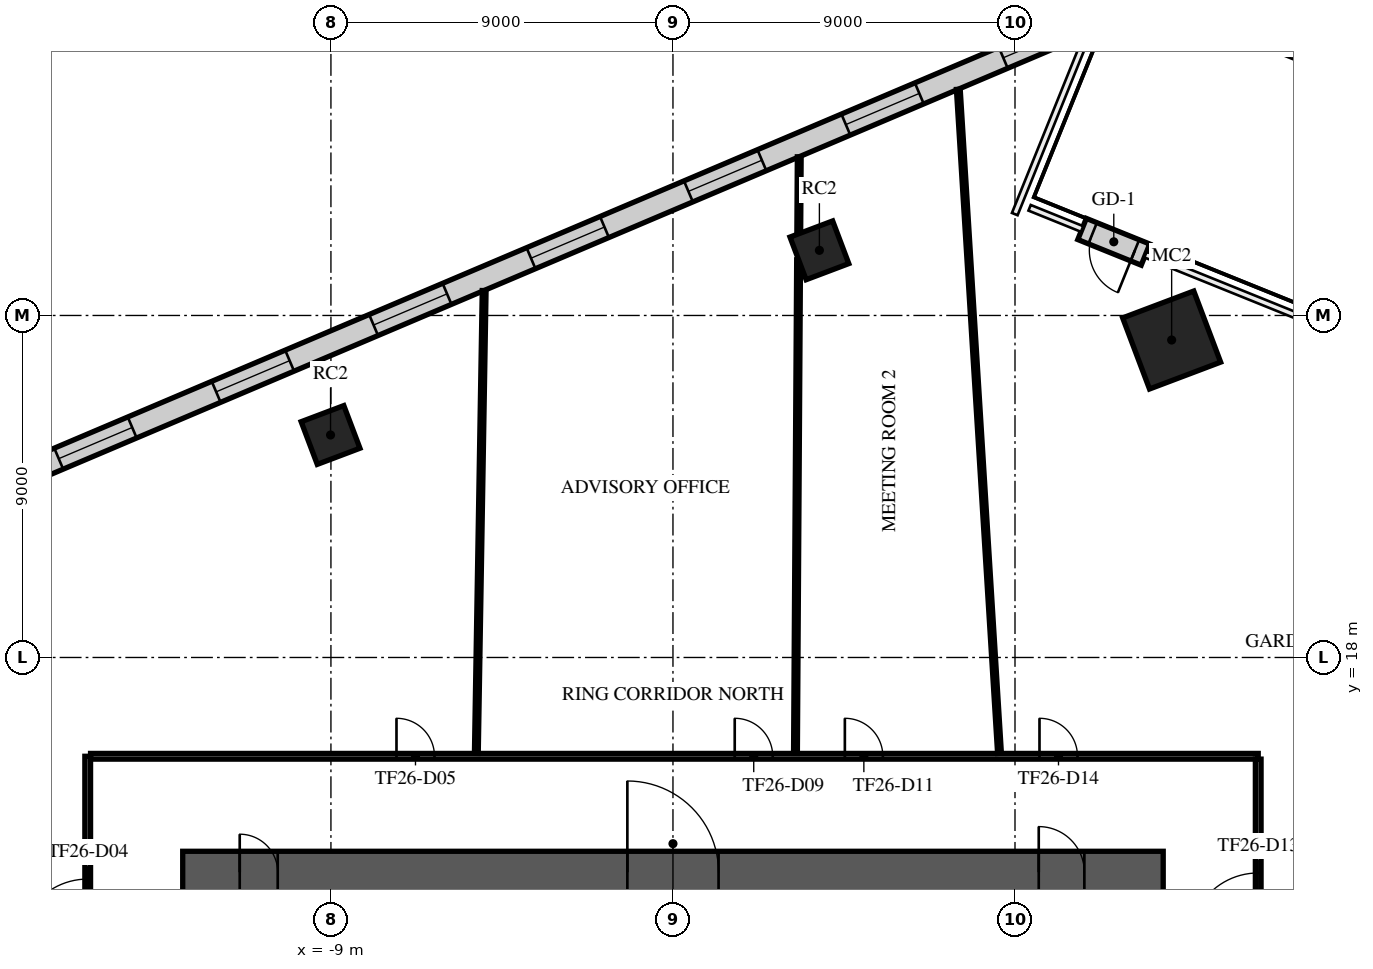
"""IFC4 building model, lengths in metres.
Left out: names, types, materials, properties, quantities, classifications, styles, units other than length and angle.
Written with IfcOpenShell. Run it as: python <this file> out.ifc"""

import sys

from ifc_helpers import new_model, si_unit, direction, frame, frame_2d, origin, origin_2d, place, context, subcontext, project, spatial, rectangle, extrude, element, fill, save


model = new_model("IFC4")
c1 = context("Model", 3, precision=1e-05, world=origin(), true_north=direction((0.0, 1.0)))
c2 = subcontext(c1, "Body", "Model", "MODEL_VIEW")
j1 = project(units=[si_unit("LENGTHUNIT", "METRE"), si_unit("PLANEANGLEUNIT", "RADIAN")], contexts=[c1])
p1 = place(None, origin())
s1 = spatial("IfcSite", under=j1, at=p1, CompositionType="ELEMENT")
p2 = place(p1, origin())
s2 = spatial("IfcBuilding", under=s1, at=p2, CompositionType="ELEMENT")
p3 = place(p2, frame((0.0, 0.0, 114.1)))
s3 = spatial("IfcBuildingStorey", under=s2, at=p3, CompositionType="ELEMENT", Elevation=114.1)
p4 = place(p3, frame((13.122, 26.354, 0.0), z_axis=(0.0, 0.0, 1.0), x_axis=(0.935491525991, 0.353349125935, 0.0)))
e1 = element("IfcColumn", 1, at=p4, inside=s3, PredefinedType="COLUMN", context=c2, shape_type="SweptSolid", body=[
    extrude(rectangle(XDim=2.0, YDim=2.0, at=origin_2d()), origin(), (0.0, 0.0, 1.0), 4.0),
])
for number, where, z_axis, x_axis in (
    (2, (3.853, 28.714, 0.0), (0.0, 0.0, 1.0), (0.935, 0.353, 0.0)),
    (3, (-9.01, 23.855, 0.0), (0.0, 0.0, 1.0), (0.935, 0.353, 0.0)),
):
    element("IfcColumn", number, at=place(p3, frame(where, z_axis=z_axis, x_axis=x_axis)), inside=s3, PredefinedType="COLUMN", context=c2, shape_type="SweptSolid", body=[
        extrude(rectangle(XDim=1.2, YDim=1.2, at=origin_2d()), origin(), (0.0, 0.0, 1.0), 4.0),
    ])
p5 = place(p3, frame((-12.9, 12.35, 0.0), z_axis=(0.0, 0.0, 1.0), x_axis=(1.0, 0.0, 0.0)))
e4 = element("IfcWall", 4, at=p5, inside=s3, PredefinedType="SHEAR", context=c2, shape_type="SweptSolid", body=[
    extrude(rectangle(XDim=25.8, YDim=1.1, at=frame_2d((12.9, 0.0))), origin(), (0.0, 0.0, 1.0), 3.58),
])
p6 = place(p5, frame((11.7, 0.0, 0.0)))
e5 = element("IfcOpeningElement", 5, at=p6, cuts=e4, PredefinedType="OPENING", context=c2, shape_type="SweptSolid", body=[
    extrude(rectangle(XDim=2.4, YDim=2.4, at=frame_2d((1.2, 1.2))), frame((0.0, 0.56, 0.0), z_axis=(0.0, -1.0, 0.0), x_axis=(1.0, 0.0, 0.0)), (0.0, 0.0, 1.0), 1.12),
])
p7 = place(p5, frame((22.525, 0.0, 0.0)))
e6 = element("IfcOpeningElement", 6, at=p7, cuts=e4, PredefinedType="OPENING", context=c2, shape_type="SweptSolid", body=[
    extrude(rectangle(XDim=1.2, YDim=2.1, at=frame_2d((0.6, 1.05))), frame((0.0, 0.56, 0.0), z_axis=(0.0, -1.0, 0.0), x_axis=(1.0, 0.0, 0.0)), (0.0, 0.0, 1.0), 1.12),
])
p8 = place(p5, frame((1.5, 0.0, 0.0)))
e7 = element("IfcOpeningElement", 7, at=p8, cuts=e4, PredefinedType="OPENING", context=c2, shape_type="SweptSolid", body=[
    extrude(rectangle(XDim=1.0, YDim=2.1, at=frame_2d((0.5, 1.05))), frame((0.0, 0.56, 0.0), z_axis=(0.0, -1.0, 0.0), x_axis=(1.0, 0.0, 0.0)), (0.0, 0.0, 1.0), 1.12),
])
p9 = place(p3, frame((11.729, 35.071, 0.0), z_axis=(0.0, 0.0, 1.0), x_axis=(-0.920505483293, -0.390729644674, 0.0)))
e8 = element("IfcWall", 8, at=p9, inside=s3, PredefinedType="STANDARD", context=c2, shape_type="SweptSolid", body=[
    extrude(rectangle(XDim=49.375, YDim=0.6, at=frame_2d((24.688, 0.0))), origin(), (0.0, 0.0, 1.0), 3.58),
])
p10 = place(p9, frame((1.2, 0.0, 0.9)))
e9 = element("IfcOpeningElement", 9, at=p10, cuts=e8, PredefinedType="OPENING", context=c2, shape_type="SweptSolid", body=[
    extrude(rectangle(XDim=2.1, YDim=2.1, at=frame_2d((1.05, 1.05))), frame((0.0, 0.31, 0.0), z_axis=(0.0, -1.0, 0.0), x_axis=(1.0, 0.0, 0.0)), (0.0, 0.0, 1.0), 0.62),
])
p11 = place(p9, frame((5.7, 0.0, 0.9)))
e10 = element("IfcOpeningElement", 10, at=p11, cuts=e8, PredefinedType="OPENING", context=c2, shape_type="SweptSolid", body=[
    extrude(rectangle(XDim=2.1, YDim=2.1, at=frame_2d((1.05, 1.05))), frame((0.0, 0.31, 0.0), z_axis=(0.0, -1.0, 0.0), x_axis=(1.0, 0.0, 0.0)), (0.0, 0.0, 1.0), 0.62),
])
p12 = place(p9, frame((10.2, 0.0, 0.9)))
e11 = element("IfcOpeningElement", 11, at=p12, cuts=e8, PredefinedType="OPENING", context=c2, shape_type="SweptSolid", body=[
    extrude(rectangle(XDim=2.1, YDim=2.1, at=frame_2d((1.05, 1.05))), frame((0.0, 0.31, 0.0), z_axis=(0.0, -1.0, 0.0), x_axis=(1.0, 0.0, 0.0)), (0.0, 0.0, 1.0), 0.62),
])
p13 = place(p9, frame((14.7, 0.0, 0.9)))
e12 = element("IfcOpeningElement", 12, at=p13, cuts=e8, PredefinedType="OPENING", context=c2, shape_type="SweptSolid", body=[
    extrude(rectangle(XDim=2.1, YDim=2.1, at=frame_2d((1.05, 1.05))), frame((0.0, 0.31, 0.0), z_axis=(0.0, -1.0, 0.0), x_axis=(1.0, 0.0, 0.0)), (0.0, 0.0, 1.0), 0.62),
])
p14 = place(p9, frame((19.2, 0.0, 0.9)))
e13 = element("IfcOpeningElement", 13, at=p14, cuts=e8, PredefinedType="OPENING", context=c2, shape_type="SweptSolid", body=[
    extrude(rectangle(XDim=2.1, YDim=2.1, at=frame_2d((1.05, 1.05))), frame((0.0, 0.31, 0.0), z_axis=(0.0, -1.0, 0.0), x_axis=(1.0, 0.0, 0.0)), (0.0, 0.0, 1.0), 0.62),
])
p15 = place(p9, frame((23.7, 0.0, 0.9)))
e14 = element("IfcOpeningElement", 14, at=p15, cuts=e8, PredefinedType="OPENING", context=c2, shape_type="SweptSolid", body=[
    extrude(rectangle(XDim=2.1, YDim=2.1, at=frame_2d((1.05, 1.05))), frame((0.0, 0.31, 0.0), z_axis=(0.0, -1.0, 0.0), x_axis=(1.0, 0.0, 0.0)), (0.0, 0.0, 1.0), 0.62),
])
p16 = place(p9, frame((28.2, 0.0, 0.9)))
e15 = element("IfcOpeningElement", 15, at=p16, cuts=e8, PredefinedType="OPENING", context=c2, shape_type="SweptSolid", body=[
    extrude(rectangle(XDim=2.1, YDim=2.1, at=frame_2d((1.05, 1.05))), frame((0.0, 0.31, 0.0), z_axis=(0.0, -1.0, 0.0), x_axis=(1.0, 0.0, 0.0)), (0.0, 0.0, 1.0), 0.62),
])
p17 = place(p9, frame((32.7, 0.0, 0.9)))
e16 = element("IfcOpeningElement", 16, at=p17, cuts=e8, PredefinedType="OPENING", context=c2, shape_type="SweptSolid", body=[
    extrude(rectangle(XDim=2.1, YDim=2.1, at=frame_2d((1.05, 1.05))), frame((0.0, 0.31, 0.0), z_axis=(0.0, -1.0, 0.0), x_axis=(1.0, 0.0, 0.0)), (0.0, 0.0, 1.0), 0.62),
])
p18 = place(p9, frame((37.2, 0.0, 0.9)))
e17 = element("IfcOpeningElement", 17, at=p18, cuts=e8, PredefinedType="OPENING", context=c2, shape_type="SweptSolid", body=[
    extrude(rectangle(XDim=2.1, YDim=2.1, at=frame_2d((1.05, 1.05))), frame((0.0, 0.31, 0.0), z_axis=(0.0, -1.0, 0.0), x_axis=(1.0, 0.0, 0.0)), (0.0, 0.0, 1.0), 0.62),
])
p19 = place(p9, frame((41.7, 0.0, 0.9)))
e18 = element("IfcOpeningElement", 18, at=p19, cuts=e8, PredefinedType="OPENING", context=c2, shape_type="SweptSolid", body=[
    extrude(rectangle(XDim=2.1, YDim=2.1, at=frame_2d((1.05, 1.05))), frame((0.0, 0.31, 0.0), z_axis=(0.0, -1.0, 0.0), x_axis=(1.0, 0.0, 0.0)), (0.0, 0.0, 1.0), 0.62),
])
p20 = place(p9, frame((46.138, 0.0, 0.9)))
e19 = element("IfcOpeningElement", 19, at=p20, cuts=e8, PredefinedType="OPENING", context=c2, shape_type="SweptSolid", body=[
    extrude(rectangle(XDim=2.1, YDim=2.1, at=frame_2d((1.05, 1.05))), frame((0.0, 0.31, 0.0), z_axis=(0.0, -1.0, 0.0), x_axis=(1.0, 0.0, 0.0)), (0.0, 0.0, 1.0), 0.62),
])
p21 = place(p3, frame((12.434, 28.602, 0.0), z_axis=(0.0, 0.0, 1.0), x_axis=(-0.927180240316, 0.374615538876, 0.0)))
e20 = element("IfcWall", 20, at=p21, inside=s3, PredefinedType="STANDARD", context=c2, shape_type="SweptSolid", body=[
    extrude(rectangle(XDim=1.8, YDim=0.6, at=frame_2d((0.9, 0.0))), origin(), (0.0, 0.0, 1.0), 3.58),
])
p22 = place(p21, frame((0.3, 0.0, 0.0)))
e21 = element("IfcOpeningElement", 21, at=p22, cuts=e20, PredefinedType="OPENING", context=c2, shape_type="SweptSolid", body=[
    extrude(rectangle(XDim=1.2, YDim=2.4, at=frame_2d((0.6, 1.2))), frame((0.0, 0.31, 0.0), z_axis=(0.0, -1.0, 0.0), x_axis=(1.0, 0.0, 0.0)), (0.0, 0.0, 1.0), 0.62),
])
p23 = place(p3, frame((-15.4, -15.4, 0.0), z_axis=(0.0, 0.0, 1.0), x_axis=(0.0, 1.0, 0.0)))
e22 = element("IfcWall", 22, at=p23, inside=s3, PredefinedType="PARTITIONING", context=c2, shape_type="SweptSolid", body=[
    extrude(rectangle(XDim=30.8, YDim=0.15, at=frame_2d((15.4, 0.0))), origin(), (0.0, 0.0, 1.0), 3.08),
])
p24 = place(p23, frame((14.541, 0.0, 0.0)))
e23 = element("IfcOpeningElement", 23, at=p24, cuts=e22, PredefinedType="OPENING", context=c2, shape_type="SweptSolid", body=[
    extrude(rectangle(XDim=1.8, YDim=2.1, at=frame_2d((0.9, 1.05))), frame((0.0, 0.085, 0.0), z_axis=(0.0, -1.0, 0.0), x_axis=(1.0, 0.0, 0.0)), (0.0, 0.0, 1.0), 0.17),
])
p25 = place(p23, frame((19.041, 0.0, 0.0)))
e24 = element("IfcOpeningElement", 24, at=p25, cuts=e22, PredefinedType="OPENING", context=c2, shape_type="SweptSolid", body=[
    extrude(rectangle(XDim=1.0, YDim=2.1, at=frame_2d((0.5, 1.05))), frame((0.0, 0.085, 0.0), z_axis=(0.0, -1.0, 0.0), x_axis=(1.0, 0.0, 0.0)), (0.0, 0.0, 1.0), 0.17),
])
p26 = place(p23, frame((11.333, 0.0, 0.0)))
e25 = element("IfcOpeningElement", 25, at=p26, cuts=e22, PredefinedType="OPENING", context=c2, shape_type="SweptSolid", body=[
    extrude(rectangle(XDim=1.0, YDim=2.1, at=frame_2d((0.5, 1.05))), frame((0.0, 0.085, 0.0), z_axis=(0.0, -1.0, 0.0), x_axis=(1.0, 0.0, 0.0)), (0.0, 0.0, 1.0), 0.17),
])
p27 = place(p23, frame((25.77, 0.0, 0.0)))
e26 = element("IfcOpeningElement", 26, at=p27, cuts=e22, PredefinedType="OPENING", context=c2, shape_type="SweptSolid", body=[
    extrude(rectangle(XDim=1.8, YDim=2.1, at=frame_2d((0.9, 1.05))), frame((0.0, 0.085, 0.0), z_axis=(0.0, -1.0, 0.0), x_axis=(1.0, 0.0, 0.0)), (0.0, 0.0, 1.0), 0.17),
])
p28 = place(p23, frame((2.8, 0.0, 0.0)))
e27 = element("IfcOpeningElement", 27, at=p28, cuts=e22, PredefinedType="OPENING", context=c2, shape_type="SweptSolid", body=[
    extrude(rectangle(XDim=1.8, YDim=2.1, at=frame_2d((0.9, 1.05))), frame((0.0, 0.085, 0.0), z_axis=(0.0, -1.0, 0.0), x_axis=(1.0, 0.0, 0.0)), (0.0, 0.0, 1.0), 0.17),
])
p29 = place(p3, frame((-15.325, 15.4, 0.0), z_axis=(0.0, 0.0, 1.0), x_axis=(1.0, 0.0, 0.0)))
e28 = element("IfcWall", 28, at=p29, inside=s3, PredefinedType="PARTITIONING", context=c2, shape_type="SweptSolid", body=[
    extrude(rectangle(XDim=30.725, YDim=0.15, at=frame_2d((15.362, 0.0))), origin(), (0.0, 0.0, 1.0), 3.08),
])
p30 = place(p29, frame((8.05, 0.0, 0.0)))
e29 = element("IfcOpeningElement", 29, at=p30, cuts=e28, PredefinedType="OPENING", context=c2, shape_type="SweptSolid", body=[
    extrude(rectangle(XDim=1.0, YDim=2.1, at=frame_2d((0.5, 1.05))), frame((0.0, 0.085, 0.0), z_axis=(0.0, -1.0, 0.0), x_axis=(1.0, 0.0, 0.0)), (0.0, 0.0, 1.0), 0.17),
])
p31 = place(p29, frame((16.95, 0.0, 0.0)))
e30 = element("IfcOpeningElement", 30, at=p31, cuts=e28, PredefinedType="OPENING", context=c2, shape_type="SweptSolid", body=[
    extrude(rectangle(XDim=1.0, YDim=2.1, at=frame_2d((0.5, 1.05))), frame((0.0, 0.085, 0.0), z_axis=(0.0, -1.0, 0.0), x_axis=(1.0, 0.0, 0.0)), (0.0, 0.0, 1.0), 0.17),
])
p32 = place(p29, frame((19.848, 0.0, 0.0)))
e31 = element("IfcOpeningElement", 31, at=p32, cuts=e28, PredefinedType="OPENING", context=c2, shape_type="SweptSolid", body=[
    extrude(rectangle(XDim=1.0, YDim=2.1, at=frame_2d((0.5, 1.05))), frame((0.0, 0.085, 0.0), z_axis=(0.0, -1.0, 0.0), x_axis=(1.0, 0.0, 0.0)), (0.0, 0.0, 1.0), 0.17),
])
p33 = place(p29, frame((24.969, 0.0, 0.0)))
e32 = element("IfcOpeningElement", 32, at=p33, cuts=e28, PredefinedType="OPENING", context=c2, shape_type="SweptSolid", body=[
    extrude(rectangle(XDim=1.0, YDim=2.1, at=frame_2d((0.5, 1.05))), frame((0.0, 0.085, 0.0), z_axis=(0.0, -1.0, 0.0), x_axis=(1.0, 0.0, 0.0)), (0.0, 0.0, 1.0), 0.17),
])
p34 = place(p3, frame((15.4, -15.325, 0.0), z_axis=(0.0, 0.0, 1.0), x_axis=(0.0, 1.0, 0.0)))
e33 = element("IfcWall", 33, at=p34, inside=s3, PredefinedType="PARTITIONING", context=c2, shape_type="SweptSolid", body=[
    extrude(rectangle(XDim=30.65, YDim=0.15, at=frame_2d((15.325, 0.0))), origin(), (0.0, 0.0, 1.0), 3.08),
])
p35 = place(p34, frame((25.855, 0.0, 0.0)))
e34 = element("IfcOpeningElement", 34, at=p35, cuts=e33, PredefinedType="OPENING", context=c2, shape_type="SweptSolid", body=[
    extrude(rectangle(XDim=1.8, YDim=2.1, at=frame_2d((0.9, 1.05))), frame((0.0, 0.085, 0.0), z_axis=(0.0, -1.0, 0.0), x_axis=(1.0, 0.0, 0.0)), (0.0, 0.0, 1.0), 0.17),
])
p36 = place(p34, frame((0.55, 0.0, 0.0)))
e35 = element("IfcOpeningElement", 35, at=p36, cuts=e33, PredefinedType="OPENING", context=c2, shape_type="SweptSolid", body=[
    extrude(rectangle(XDim=1.8, YDim=2.1, at=frame_2d((0.9, 1.05))), frame((0.0, 0.085, 0.0), z_axis=(0.0, -1.0, 0.0), x_axis=(1.0, 0.0, 0.0)), (0.0, 0.0, 1.0), 0.17),
])
p37 = place(p34, frame((7.8, 0.0, 0.0)))
e36 = element("IfcOpeningElement", 36, at=p37, cuts=e33, PredefinedType="OPENING", context=c2, shape_type="SweptSolid", body=[
    extrude(rectangle(XDim=1.0, YDim=2.1, at=frame_2d((0.5, 1.05))), frame((0.0, 0.085, 0.0), z_axis=(0.0, -1.0, 0.0), x_axis=(1.0, 0.0, 0.0)), (0.0, 0.0, 1.0), 0.17),
])
p38 = place(p34, frame((18.448, 0.0, 0.0)))
e37 = element("IfcOpeningElement", 37, at=p38, cuts=e33, PredefinedType="OPENING", context=c2, shape_type="SweptSolid", body=[
    extrude(rectangle(XDim=1.0, YDim=2.1, at=frame_2d((0.5, 1.05))), frame((0.0, 0.085, 0.0), z_axis=(0.0, -1.0, 0.0), x_axis=(1.0, 0.0, 0.0)), (0.0, 0.0, 1.0), 0.17),
])
p39 = place(p34, frame((14.308, 0.0, 0.0)))
e38 = element("IfcOpeningElement", 38, at=p39, cuts=e33, PredefinedType="OPENING", context=c2, shape_type="SweptSolid", body=[
    extrude(rectangle(XDim=1.0, YDim=2.1, at=frame_2d((0.5, 1.05))), frame((0.0, 0.085, 0.0), z_axis=(0.0, -1.0, 0.0), x_axis=(1.0, 0.0, 0.0)), (0.0, 0.0, 1.0), 0.17),
])
p40 = place(p3, frame((-5.174, 15.476, 0.0), z_axis=(0.0, 0.0, 1.0), x_axis=(0.016875741067, 0.999857594542, 0.0)))
e39 = element("IfcWall", 39, at=p40, inside=s3, PredefinedType="PARTITIONING", context=c2, shape_type="SweptSolid", body=[
    extrude(rectangle(XDim=12.181, YDim=0.1, at=frame_2d((6.091, 0.0))), origin(), (0.0, 0.0, 1.0), 2.83),
])
p41 = place(p3, frame((3.223, 15.475, 0.0), z_axis=(0.0, 0.0, 1.0), x_axis=(0.006333864112, 0.999979940882, 0.0)))
e40 = element("IfcWall", 40, at=p41, inside=s3, PredefinedType="PARTITIONING", context=c2, shape_type="SweptSolid", body=[
    extrude(rectangle(XDim=12.99, YDim=0.1, at=frame_2d((6.495, 0.0))), origin(), (0.0, 0.0, 1.0), 2.83),
])
p42 = place(p3, frame((3.31, 29.15, 0.0), z_axis=(0.0, 0.0, 1.0), x_axis=(0.006392343161, 0.999979568766, 0.0)))
e41 = element("IfcWall", 41, at=p42, inside=s3, PredefinedType="PARTITIONING", context=c2, shape_type="SweptSolid", body=[
    extrude(rectangle(XDim=2.024, YDim=0.1, at=frame_2d((1.012, 0.0))), origin(), (0.0, 0.0, 1.0), 3.58),
])
p43 = place(p3, frame((7.509, 32.951, 0.0), z_axis=(0.0, 0.0, 1.0), x_axis=(0.061903377762, -0.99808214683, 0.0)))
e42 = element("IfcWall", 42, at=p43, inside=s3, PredefinedType="PARTITIONING", context=c2, shape_type="SweptSolid", body=[
    extrude(rectangle(XDim=17.507, YDim=0.1, at=frame_2d((8.753, 0.0))), origin(), (0.0, 0.0, 1.0), 2.83),
])
p44 = place(p6, origin())
e43 = element("IfcDoor", 43, at=p44, inside=s3, OperationType="SINGLE_SWING_LEFT", PredefinedType="DOOR", context=c2, shape_type="SweptSolid", body=[
    extrude(rectangle(XDim=2.4, YDim=2.4, at=frame_2d((1.2, 1.2))), frame((0.0, 0.025, 0.0), z_axis=(0.0, -1.0, 0.0), x_axis=(1.0, 0.0, 0.0)), (0.0, 0.0, 1.0), 0.05),
])
fill(e5, e43)
p45 = place(p7, origin())
e44 = element("IfcDoor", 44, at=p45, inside=s3, OperationType="SINGLE_SWING_LEFT", PredefinedType="DOOR", context=c2, shape_type="SweptSolid", body=[
    extrude(rectangle(XDim=1.2, YDim=2.1, at=frame_2d((0.6, 1.05))), frame((0.0, 0.025, 0.0), z_axis=(0.0, -1.0, 0.0), x_axis=(1.0, 0.0, 0.0)), (0.0, 0.0, 1.0), 0.05),
])
fill(e6, e44)
p46 = place(p8, origin())
e45 = element("IfcDoor", 45, at=p46, inside=s3, OperationType="SINGLE_SWING_LEFT", PredefinedType="DOOR", context=c2, shape_type="SweptSolid", body=[
    extrude(rectangle(XDim=1.0, YDim=2.1, at=frame_2d((0.5, 1.05))), frame((0.0, 0.025, 0.0), z_axis=(0.0, -1.0, 0.0), x_axis=(1.0, 0.0, 0.0)), (0.0, 0.0, 1.0), 0.05),
])
fill(e7, e45)
p47 = place(p10, origin())
e46 = element("IfcWindow", 46, at=p47, inside=s3, PartitioningType="SINGLE_PANEL", PredefinedType="WINDOW", context=c2, shape_type="SweptSolid", body=[
    extrude(rectangle(XDim=2.1, YDim=2.1, at=frame_2d((1.05, 1.05))), frame((0.0, 0.03, 0.0), z_axis=(0.0, -1.0, 0.0), x_axis=(1.0, 0.0, 0.0)), (0.0, 0.0, 1.0), 0.06),
])
fill(e9, e46)
p48 = place(p11, origin())
e47 = element("IfcWindow", 47, at=p48, inside=s3, PartitioningType="SINGLE_PANEL", PredefinedType="WINDOW", context=c2, shape_type="SweptSolid", body=[
    extrude(rectangle(XDim=2.1, YDim=2.1, at=frame_2d((1.05, 1.05))), frame((0.0, 0.03, 0.0), z_axis=(0.0, -1.0, 0.0), x_axis=(1.0, 0.0, 0.0)), (0.0, 0.0, 1.0), 0.06),
])
fill(e10, e47)
p49 = place(p12, origin())
e48 = element("IfcWindow", 48, at=p49, inside=s3, PartitioningType="SINGLE_PANEL", PredefinedType="WINDOW", context=c2, shape_type="SweptSolid", body=[
    extrude(rectangle(XDim=2.1, YDim=2.1, at=frame_2d((1.05, 1.05))), frame((0.0, 0.03, 0.0), z_axis=(0.0, -1.0, 0.0), x_axis=(1.0, 0.0, 0.0)), (0.0, 0.0, 1.0), 0.06),
])
fill(e11, e48)
p50 = place(p13, origin())
e49 = element("IfcWindow", 49, at=p50, inside=s3, PartitioningType="SINGLE_PANEL", PredefinedType="WINDOW", context=c2, shape_type="SweptSolid", body=[
    extrude(rectangle(XDim=2.1, YDim=2.1, at=frame_2d((1.05, 1.05))), frame((0.0, 0.03, 0.0), z_axis=(0.0, -1.0, 0.0), x_axis=(1.0, 0.0, 0.0)), (0.0, 0.0, 1.0), 0.06),
])
fill(e12, e49)
p51 = place(p14, origin())
e50 = element("IfcWindow", 50, at=p51, inside=s3, PartitioningType="SINGLE_PANEL", PredefinedType="WINDOW", context=c2, shape_type="SweptSolid", body=[
    extrude(rectangle(XDim=2.1, YDim=2.1, at=frame_2d((1.05, 1.05))), frame((0.0, 0.03, 0.0), z_axis=(0.0, -1.0, 0.0), x_axis=(1.0, 0.0, 0.0)), (0.0, 0.0, 1.0), 0.06),
])
fill(e13, e50)
p52 = place(p15, origin())
e51 = element("IfcWindow", 51, at=p52, inside=s3, PartitioningType="SINGLE_PANEL", PredefinedType="WINDOW", context=c2, shape_type="SweptSolid", body=[
    extrude(rectangle(XDim=2.1, YDim=2.1, at=frame_2d((1.05, 1.05))), frame((0.0, 0.03, 0.0), z_axis=(0.0, -1.0, 0.0), x_axis=(1.0, 0.0, 0.0)), (0.0, 0.0, 1.0), 0.06),
])
fill(e14, e51)
p53 = place(p16, origin())
e52 = element("IfcWindow", 52, at=p53, inside=s3, PartitioningType="SINGLE_PANEL", PredefinedType="WINDOW", context=c2, shape_type="SweptSolid", body=[
    extrude(rectangle(XDim=2.1, YDim=2.1, at=frame_2d((1.05, 1.05))), frame((0.0, 0.03, 0.0), z_axis=(0.0, -1.0, 0.0), x_axis=(1.0, 0.0, 0.0)), (0.0, 0.0, 1.0), 0.06),
])
fill(e15, e52)
p54 = place(p22, origin())
e53 = element("IfcDoor", 53, at=p54, inside=s3, OperationType="SINGLE_SWING_LEFT", PredefinedType="DOOR", context=c2, shape_type="SweptSolid", body=[
    extrude(rectangle(XDim=1.2, YDim=2.4, at=frame_2d((0.6, 1.2))), frame((0.0, 0.025, 0.0), z_axis=(0.0, -1.0, 0.0), x_axis=(1.0, 0.0, 0.0)), (0.0, 0.0, 1.0), 0.05),
])
fill(e21, e53)
p55 = place(p27, origin())
e54 = element("IfcDoor", 54, at=p55, inside=s3, OperationType="DOUBLE_DOOR_SINGLE_SWING", PredefinedType="DOOR", context=c2, shape_type="SweptSolid", body=[
    extrude(rectangle(XDim=1.8, YDim=2.1, at=frame_2d((0.9, 1.05))), frame((0.0, 0.025, 0.0), z_axis=(0.0, -1.0, 0.0), x_axis=(1.0, 0.0, 0.0)), (0.0, 0.0, 1.0), 0.05),
])
fill(e26, e54)
p56 = place(p30, origin())
e55 = element("IfcDoor", 55, at=p56, inside=s3, OperationType="SINGLE_SWING_RIGHT", PredefinedType="DOOR", context=c2, shape_type="SweptSolid", body=[
    extrude(rectangle(XDim=1.0, YDim=2.1, at=frame_2d((0.5, 1.05))), frame((0.0, 0.025, 0.0), z_axis=(0.0, -1.0, 0.0), x_axis=(1.0, 0.0, 0.0)), (0.0, 0.0, 1.0), 0.05),
])
fill(e29, e55)
p57 = place(p31, origin())
e56 = element("IfcDoor", 56, at=p57, inside=s3, OperationType="SINGLE_SWING_RIGHT", PredefinedType="DOOR", context=c2, shape_type="SweptSolid", body=[
    extrude(rectangle(XDim=1.0, YDim=2.1, at=frame_2d((0.5, 1.05))), frame((0.0, 0.025, 0.0), z_axis=(0.0, -1.0, 0.0), x_axis=(1.0, 0.0, 0.0)), (0.0, 0.0, 1.0), 0.05),
])
fill(e30, e56)
p58 = place(p32, origin())
e57 = element("IfcDoor", 57, at=p58, inside=s3, OperationType="SINGLE_SWING_LEFT", PredefinedType="DOOR", context=c2, shape_type="SweptSolid", body=[
    extrude(rectangle(XDim=1.0, YDim=2.1, at=frame_2d((0.5, 1.05))), frame((0.0, 0.025, 0.0), z_axis=(0.0, -1.0, 0.0), x_axis=(1.0, 0.0, 0.0)), (0.0, 0.0, 1.0), 0.05),
])
fill(e31, e57)
p59 = place(p35, frame((1.8, 0.0, 0.0), z_axis=(0.0, 0.0, 1.0), x_axis=(-1.0, 0.0, 0.0)))
e58 = element("IfcDoor", 58, at=p59, inside=s3, OperationType="DOUBLE_DOOR_SINGLE_SWING", PredefinedType="DOOR", context=c2, shape_type="SweptSolid", body=[
    extrude(rectangle(XDim=1.8, YDim=2.1, at=frame_2d((0.9, 1.05))), frame((0.0, 0.025, 0.0), z_axis=(0.0, -1.0, 0.0), x_axis=(1.0, 0.0, 0.0)), (0.0, 0.0, 1.0), 0.05),
])
fill(e34, e58)
p60 = place(p33, origin())
e59 = element("IfcDoor", 59, at=p60, inside=s3, OperationType="SINGLE_SWING_LEFT", PredefinedType="DOOR", context=c2, shape_type="SweptSolid", body=[
    extrude(rectangle(XDim=1.0, YDim=2.1, at=frame_2d((0.5, 1.05))), frame((0.0, 0.025, 0.0), z_axis=(0.0, -1.0, 0.0), x_axis=(1.0, 0.0, 0.0)), (0.0, 0.0, 1.0), 0.05),
])
fill(e32, e59)
save(model, sys.argv[1])
